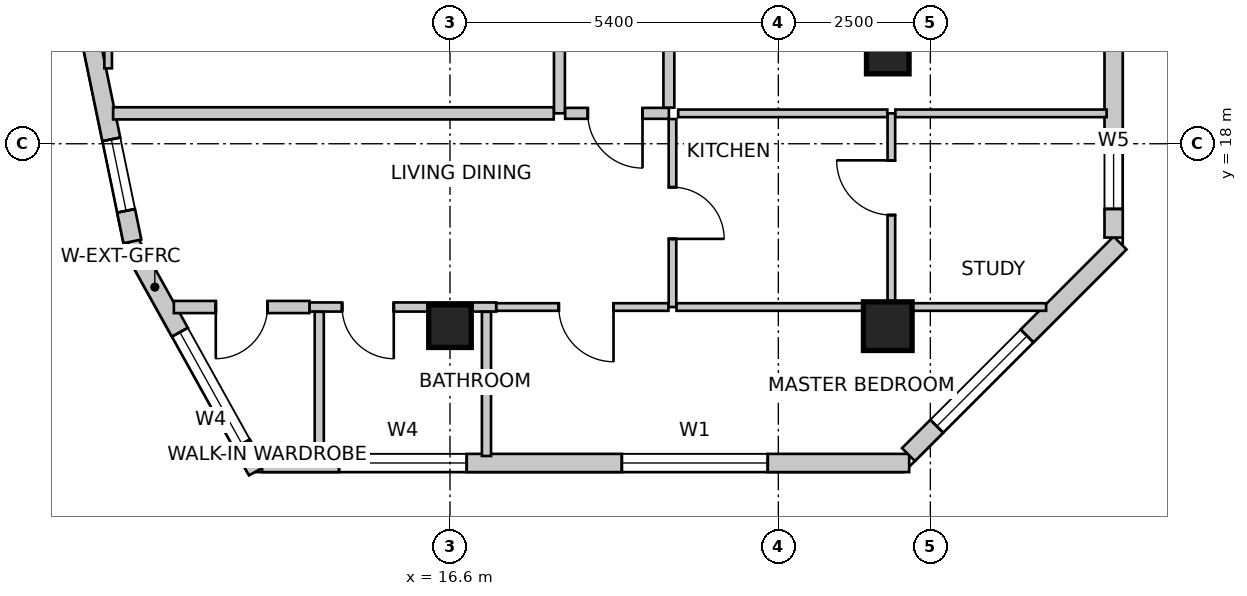
"""IFC4 building model, lengths in metres.
Left out: names, types, materials, properties, quantities, classifications, styles, units other than length and angle.
Written with IfcOpenShell. Run it as: python <this file> out.ifc"""

import sys

from ifc_helpers import new_model, si_unit, direction, frame, frame_2d, origin, origin_2d, place, context, subcontext, project, spatial, rectangle, extrude, source, transform, mapped, element, fill, save


model = new_model("IFC4")
c1 = context("Model", 3, precision=1e-05, world=origin(), true_north=direction((0.0, 1.0)))
c2 = subcontext(c1, "Body", "Model", "MODEL_VIEW")
j1 = project(units=[si_unit("LENGTHUNIT", "METRE"), si_unit("PLANEANGLEUNIT", "RADIAN")], contexts=[c1])
p1 = place(None, origin())
s1 = spatial("IfcSite", under=j1, at=p1, CompositionType="ELEMENT")
p2 = place(p1, origin())
s2 = spatial("IfcBuilding", under=s1, at=p2, CompositionType="ELEMENT")
p3 = place(p2, frame((0.0, 0.0, 193.9)))
s3 = spatial("IfcBuildingStorey", under=s2, at=p3, CompositionType="ELEMENT", Elevation=193.9)
m1 = source(origin(), c2, "Body", "SweptSolid", [
    extrude(rectangle(XDim=0.7, YDim=0.7, at=origin_2d()), origin(), (0.0, 0.0, 1.0), 3.5),
])
p4 = place(p3, frame((23.8, 19.5, 0.0), z_axis=(0.0, 0.0, 1.0), x_axis=(1.0, 0.0, 0.0)))
e1 = element("IfcColumn", 1, at=p4, inside=s3, PredefinedType="COLUMN", context=c2, shape_type="MappedRepresentation", body=[
    mapped(m1, transform((0.0, 0.0, 0.0), scale=1.0)),
])
m2 = source(origin(), c2, "Body", "SweptSolid", [
    extrude(rectangle(XDim=0.8, YDim=0.8, at=origin_2d()), origin(), (0.0, 0.0, 1.0), 3.5),
])
p5 = place(p3, frame((23.8, 15.0, 0.0), z_axis=(0.0, 0.0, 1.0), x_axis=(1.0, 0.0, 0.0)))
e2 = element("IfcColumn", 2, at=p5, inside=s3, PredefinedType="COLUMN", context=c2, shape_type="MappedRepresentation", body=[
    mapped(m2, transform((0.0, 0.0, 0.0), scale=1.0)),
])
p6 = place(p3, frame((16.6, 15.0, 0.0), z_axis=(0.0, 0.0, 1.0), x_axis=(1.0, 0.0, 0.0)))
e3 = element("IfcColumn", 3, at=p6, inside=s3, PredefinedType="COLUMN", context=c2, shape_type="MappedRepresentation", body=[
    mapped(m1, transform((0.0, 0.0, 0.0), scale=1.0)),
])
p7 = place(p3, frame((11.333, 16.384, 0.0), z_axis=(0.0, 0.0, 1.0), x_axis=(0.485633305139, -0.874162623852, 0.0)))
e4 = element("IfcWall", 4, at=p7, inside=s3, PredefinedType="SOLIDWALL", context=c2, shape_type="SweptSolid", body=[
    extrude(rectangle(XDim=4.307, YDim=0.3, at=frame_2d((2.153, 0.0))), origin(), (0.0, 0.0, 1.0), 3.25),
])
m3 = source(origin(), c2, "Body", "SweptSolid", [
    extrude(rectangle(XDim=2.1, YDim=2.0, at=frame_2d((1.05, 1.0))), frame((0.0, 0.16, 0.0), z_axis=(0.0, -1.0, 0.0), x_axis=(1.0, 0.0, 0.0)), (0.0, 0.0, 1.0), 0.32),
])
p8 = place(p7, frame((1.697, 0.0, 0.85)))
e5 = element("IfcOpeningElement", 5, at=p8, cuts=e4, PredefinedType="OPENING", context=c2, shape_type="MappedRepresentation", body=[
    mapped(m3, transform((0.0, 0.0, 0.0), scale=1.0)),
])
p9 = place(p3, frame((13.51, 12.75, 0.0), z_axis=(0.0, 0.0, 1.0), x_axis=(1.0, 0.0, 0.0)))
e6 = element("IfcWall", 6, at=p9, inside=s3, PredefinedType="SOLIDWALL", context=c2, shape_type="SweptSolid", body=[
    extrude(rectangle(XDim=10.642, YDim=0.3, at=frame_2d((5.321, 0.0))), origin(), (0.0, 0.0, 1.0), 3.25),
])
p10 = place(p9, frame((1.265, 0.0, 0.85)))
e7 = element("IfcOpeningElement", 7, at=p10, cuts=e6, PredefinedType="OPENING", context=c2, shape_type="MappedRepresentation", body=[
    mapped(m3, transform((0.0, 0.0, 0.0), scale=1.0)),
])
m4 = source(origin(), c2, "Body", "SweptSolid", [
    extrude(rectangle(XDim=2.4, YDim=2.2, at=frame_2d((1.2, 1.1))), frame((0.0, 0.16, 0.0), z_axis=(0.0, -1.0, 0.0), x_axis=(1.0, 0.0, 0.0)), (0.0, 0.0, 1.0), 0.32),
])
p11 = place(p9, frame((5.916, 0.0, 0.85)))
e8 = element("IfcOpeningElement", 8, at=p11, cuts=e6, PredefinedType="OPENING", context=c2, shape_type="MappedRepresentation", body=[
    mapped(m4, transform((0.0, 0.0, 0.0), scale=1.0)),
])
p12 = place(p3, frame((24.14, 12.888, 0.0), z_axis=(0.0, 0.0, 1.0), x_axis=(0.707106781187, 0.707106781187, 0.0)))
e9 = element("IfcWall", 9, at=p12, inside=s3, PredefinedType="SOLIDWALL", context=c2, shape_type="SweptSolid", body=[
    extrude(rectangle(XDim=4.922, YDim=0.3, at=frame_2d((2.461, 0.0))), origin(), (0.0, 0.0, 1.0), 3.25),
])
p13 = place(p12, frame((0.659, 0.0, 0.85)))
e10 = element("IfcOpeningElement", 10, at=p13, cuts=e9, PredefinedType="OPENING", context=c2, shape_type="MappedRepresentation", body=[
    mapped(m3, transform((0.0, 0.0, 0.0), scale=1.0)),
])
p14 = place(p3, frame((27.514, 16.457, 0.0), z_axis=(0.0, 0.0, 1.0), x_axis=(0.0, 1.0, 0.0)))
e11 = element("IfcWall", 11, at=p14, inside=s3, PredefinedType="SOLIDWALL", context=c2, shape_type="SweptSolid", body=[
    extrude(rectangle(XDim=13.679, YDim=0.3, at=frame_2d((6.839, 0.0))), origin(), (0.0, 0.0, 1.0), 3.25),
])
m5 = source(origin(), c2, "Body", "SweptSolid", [
    extrude(rectangle(XDim=1.6, YDim=2.15, at=frame_2d((0.8, 1.075))), frame((0.0, 0.16, 0.0), z_axis=(0.0, -1.0, 0.0), x_axis=(1.0, 0.0, 0.0)), (0.0, 0.0, 1.0), 0.32),
])
p15 = place(p14, frame((8.993, 0.0, 0.0)))
e12 = element("IfcOpeningElement", 12, at=p15, cuts=e11, PredefinedType="OPENING", context=c2, shape_type="MappedRepresentation", body=[
    mapped(m5, transform((0.0, 0.0, 0.0), scale=1.0)),
])
m6 = source(origin(), c2, "Body", "SweptSolid", [
    extrude(rectangle(XDim=1.2, YDim=1.6, at=frame_2d((0.6, 0.8))), frame((0.0, 0.16, 0.0), z_axis=(0.0, -1.0, 0.0), x_axis=(1.0, 0.0, 0.0)), (0.0, 0.0, 1.0), 0.32),
])
p16 = place(p14, frame((0.471, 0.0, 0.85)))
e13 = element("IfcOpeningElement", 13, at=p16, cuts=e11, PredefinedType="OPENING", context=c2, shape_type="MappedRepresentation", body=[
    mapped(m6, transform((0.0, 0.0, 0.0), scale=1.0)),
])
p17 = place(p14, frame((4.288, 0.0, 0.85)))
e14 = element("IfcOpeningElement", 14, at=p17, cuts=e11, PredefinedType="OPENING", context=c2, shape_type="MappedRepresentation", body=[
    mapped(m4, transform((0.0, 0.0, 0.0), scale=1.0)),
])
p18 = place(p14, frame((10.916, 0.0, 0.85)))
e15 = element("IfcOpeningElement", 15, at=p18, cuts=e11, PredefinedType="OPENING", context=c2, shape_type="MappedRepresentation", body=[
    mapped(m4, transform((0.0, 0.0, 0.0), scale=1.0)),
])
p19 = place(p3, frame((8.188, 31.834, 0.0), z_axis=(0.0, 0.0, 1.0), x_axis=(0.202303475707, -0.979322880217, 0.0)))
e16 = element("IfcWall", 16, at=p19, inside=s3, PredefinedType="SOLIDWALL", context=c2, shape_type="SweptSolid", body=[
    extrude(rectangle(XDim=15.766, YDim=0.3, at=frame_2d((7.883, 0.0))), origin(), (0.0, 0.0, 1.0), 3.25),
])
p20 = place(p19, frame((2.399, 0.0, 0.85)))
e17 = element("IfcOpeningElement", 17, at=p20, cuts=e16, PredefinedType="OPENING", context=c2, shape_type="MappedRepresentation", body=[
    mapped(m3, transform((0.0, 0.0, 0.0), scale=1.0)),
])
p21 = place(p19, frame((8.798, 0.0, 0.85)))
e18 = element("IfcOpeningElement", 18, at=p21, cuts=e16, PredefinedType="OPENING", context=c2, shape_type="MappedRepresentation", body=[
    mapped(m3, transform((0.0, 0.0, 0.0), scale=1.0)),
])
p22 = place(p19, frame((14.052, 0.0, 0.85)))
e19 = element("IfcOpeningElement", 19, at=p22, cuts=e16, PredefinedType="OPENING", context=c2, shape_type="MappedRepresentation", body=[
    mapped(m6, transform((0.0, 0.0, 0.0), scale=1.0)),
])
p23 = place(p3, frame((18.4, 18.5, 0.0), z_axis=(0.0, 0.0, 1.0), x_axis=(0.0, 1.0, 0.0)))
e20 = element("IfcWall", 20, at=p23, inside=s3, PredefinedType="PARTITIONING", context=c2, shape_type="SweptSolid", body=[
    extrude(rectangle(XDim=6.86, YDim=0.18, at=frame_2d((3.43, 0.0))), origin(), (0.0, 0.0, 1.0), 2.688),
])
m7 = source(origin(), c2, "Body", "SweptSolid", [
    extrude(rectangle(XDim=0.9, YDim=2.15, at=frame_2d((0.45, 1.075))), frame((0.0, 0.1, 0.0), z_axis=(0.0, -1.0, 0.0), x_axis=(1.0, 0.0, 0.0)), (0.0, 0.0, 1.0), 0.2),
])
p24 = place(p23, frame((2.98, 0.0, 0.0)))
e21 = element("IfcOpeningElement", 21, at=p24, cuts=e20, PredefinedType="OPENING", context=c2, shape_type="MappedRepresentation", body=[
    mapped(m7, transform((0.0, 0.0, 0.0), scale=1.0)),
])
p25 = place(p3, frame((20.2, 18.5, 0.0), z_axis=(0.0, 0.0, 1.0), x_axis=(-1.0, 0.0, 0.0)))
e22 = element("IfcWall", 22, at=p25, inside=s3, PredefinedType="PARTITIONING", context=c2, shape_type="SweptSolid", body=[
    extrude(rectangle(XDim=1.706, YDim=0.18, at=frame_2d((0.853, 0.0))), origin(), (0.0, 0.0, 1.0), 3.25),
])
p26 = place(p25, frame((0.434, 0.0, 0.0)))
e23 = element("IfcOpeningElement", 23, at=p26, cuts=e22, PredefinedType="OPENING", context=c2, shape_type="MappedRepresentation", body=[
    mapped(m7, transform((0.0, 0.0, 0.0), scale=1.0)),
])
p27 = place(p3, frame((20.2, 31.806, 0.0), z_axis=(0.0, 0.0, 1.0), x_axis=(0.0, -1.0, 0.0)))
e24 = element("IfcWall", 24, at=p27, inside=s3, PredefinedType="PARTITIONING", context=c2, shape_type="SweptSolid", body=[
    extrude(rectangle(XDim=13.212, YDim=0.18, at=frame_2d((6.606, 0.0))), origin(), (0.0, 0.0, 1.0), 2.688),
])
p28 = place(p27, frame((6.095, 0.0, 0.0)))
e25 = element("IfcOpeningElement", 25, at=p28, cuts=e24, PredefinedType="OPENING", context=c2, shape_type="MappedRepresentation", body=[
    mapped(m7, transform((0.0, 0.0, 0.0), scale=1.0)),
])
p29 = place(p3, frame((10.978, 19.24, 0.0), z_axis=(0.0, 0.0, 1.0), x_axis=(0.0, 1.0, 0.0)))
e26 = element("IfcWall", 26, at=p29, inside=s3, PredefinedType="PARTITIONING", context=c2, shape_type="SweptSolid", body=[
    extrude(rectangle(XDim=5.96, YDim=0.125, at=frame_2d((2.98, 0.0))), origin(), (0.0, 0.0, 1.0), 2.542),
])
m8 = source(origin(), c2, "Body", "SweptSolid", [
    extrude(rectangle(XDim=0.85, YDim=2.15, at=frame_2d((0.425, 1.075))), frame((0.0, 0.073, 0.0), z_axis=(0.0, -1.0, 0.0), x_axis=(1.0, 0.0, 0.0)), (0.0, 0.0, 1.0), 0.145),
])
p30 = place(p29, frame((2.125, 0.0, 0.0)))
e27 = element("IfcOpeningElement", 27, at=p30, cuts=e26, PredefinedType="OPENING", context=c2, shape_type="MappedRepresentation", body=[
    mapped(m8, transform((0.0, 0.0, 0.0), scale=1.0)),
])
p31 = place(p3, frame((18.306, 18.5, 0.0), z_axis=(0.0, 0.0, 1.0), x_axis=(-1.0, 0.0, 0.0)))
e28 = element("IfcWall", 28, at=p31, inside=s3, PredefinedType="PARTITIONING", context=c2, shape_type="SweptSolid", body=[
    extrude(rectangle(XDim=7.246, YDim=0.2, at=frame_2d((3.623, 0.0))), origin(), (0.0, 0.0, 1.0), 3.25),
])
p32 = place(p3, frame((23.859, 15.315, 0.0), z_axis=(0.0, 0.0, 1.0), x_axis=(0.0, 1.0, 0.0)))
e29 = element("IfcWall", 29, at=p32, inside=s3, PredefinedType="PARTITIONING", context=c2, shape_type="SweptSolid", body=[
    extrude(rectangle(XDim=3.185, YDim=0.125, at=frame_2d((1.593, 0.0))), origin(), (0.0, 0.0, 1.0), 2.542),
])
m9 = source(origin(), c2, "Body", "SweptSolid", [
    extrude(rectangle(XDim=0.9, YDim=2.15, at=frame_2d((0.45, 1.075))), frame((0.0, 0.073, 0.0), z_axis=(0.0, -1.0, 0.0), x_axis=(1.0, 0.0, 0.0)), (0.0, 0.0, 1.0), 0.145),
])
p33 = place(p32, frame((1.512, 0.0, 0.0)))
e30 = element("IfcOpeningElement", 30, at=p33, cuts=e29, PredefinedType="OPENING", context=c2, shape_type="MappedRepresentation", body=[
    mapped(m9, transform((0.0, 0.0, 0.0), scale=1.0)),
])
p34 = place(p3, frame((26.404, 15.315, 0.0), z_axis=(0.0, 0.0, 1.0), x_axis=(-1.0, 0.0, 0.0)))
e31 = element("IfcWall", 31, at=p34, inside=s3, PredefinedType="PARTITIONING", context=c2, shape_type="SweptSolid", body=[
    extrude(rectangle(XDim=2.479, YDim=0.125, at=frame_2d((1.239, 0.0))), origin(), (0.0, 0.0, 1.0), 3.25),
])
p35 = place(p3, frame((23.926, 18.5, 0.0), z_axis=(0.0, 0.0, 1.0), x_axis=(1.0, 0.0, 0.0)))
e32 = element("IfcWall", 32, at=p35, inside=s3, PredefinedType="PARTITIONING", context=c2, shape_type="SweptSolid", body=[
    extrude(rectangle(XDim=3.473, YDim=0.125, at=frame_2d((1.737, 0.0))), origin(), (0.0, 0.0, 1.0), 3.25),
])
p36 = place(p3, frame((20.259, 18.406, 0.0), z_axis=(0.0, 0.0, 1.0), x_axis=(0.0, -1.0, 0.0)))
e33 = element("IfcWall", 33, at=p36, inside=s3, PredefinedType="PARTITIONING", context=c2, shape_type="SweptSolid", body=[
    extrude(rectangle(XDim=3.091, YDim=0.125, at=frame_2d((1.545, 0.0))), origin(), (0.0, 0.0, 1.0), 2.688),
])
p37 = place(p36, frame((1.121, 0.0, 0.0)))
e34 = element("IfcOpeningElement", 34, at=p37, cuts=e33, PredefinedType="OPENING", context=c2, shape_type="MappedRepresentation", body=[
    mapped(m8, transform((0.0, 0.0, 0.0), scale=1.0)),
])
p38 = place(p3, frame((17.36, 15.315, 0.0), z_axis=(0.0, 0.0, 1.0), x_axis=(-1.0, 0.0, 0.0)))
e35 = element("IfcWall", 35, at=p38, inside=s3, PredefinedType="PARTITIONING", context=c2, shape_type="SweptSolid", body=[
    extrude(rectangle(XDim=3.07, YDim=0.15, at=frame_2d((1.535, 0.0))), origin(), (0.0, 0.0, 1.0), 2.688),
])
m10 = source(origin(), c2, "Body", "SweptSolid", [
    extrude(rectangle(XDim=0.85, YDim=2.15, at=frame_2d((0.425, 1.075))), frame((0.0, 0.085, 0.0), z_axis=(0.0, -1.0, 0.0), x_axis=(1.0, 0.0, 0.0)), (0.0, 0.0, 1.0), 0.17),
])
p39 = place(p38, frame((1.685, 0.0, 0.0)))
e36 = element("IfcOpeningElement", 36, at=p39, cuts=e35, PredefinedType="OPENING", context=c2, shape_type="MappedRepresentation", body=[
    mapped(m10, transform((0.0, 0.0, 0.0), scale=1.0)),
])
p40 = place(p3, frame((14.288, 15.315, 0.0), z_axis=(0.0, 0.0, 1.0), x_axis=(-1.0, 0.0, 0.0)))
e37 = element("IfcWall", 37, at=p40, inside=s3, PredefinedType="PARTITIONING", context=c2, shape_type="SweptSolid", body=[
    extrude(rectangle(XDim=2.229, YDim=0.2, at=frame_2d((1.115, 0.0))), origin(), (0.0, 0.0, 1.0), 3.25),
])
m11 = source(origin(), c2, "Body", "SweptSolid", [
    extrude(rectangle(XDim=0.85, YDim=2.15, at=frame_2d((0.425, 1.075))), frame((0.0, 0.11, 0.0), z_axis=(0.0, -1.0, 0.0), x_axis=(1.0, 0.0, 0.0)), (0.0, 0.0, 1.0), 0.22),
])
p41 = place(p40, frame((0.69, 0.0, 0.0)))
e38 = element("IfcOpeningElement", 38, at=p41, cuts=e37, PredefinedType="OPENING", context=c2, shape_type="MappedRepresentation", body=[
    mapped(m11, transform((0.0, 0.0, 0.0), scale=1.0)),
])
p42 = place(p3, frame((20.192, 15.315, 0.0), z_axis=(0.0, 0.0, 1.0), x_axis=(-1.0, 0.0, 0.0)))
e39 = element("IfcWall", 39, at=p42, inside=s3, PredefinedType="PARTITIONING", context=c2, shape_type="SweptSolid", body=[
    extrude(rectangle(XDim=2.83, YDim=0.125, at=frame_2d((1.415, 0.0))), origin(), (0.0, 0.0, 1.0), 3.25),
])
p43 = place(p42, frame((0.903, 0.0, 0.0)))
e40 = element("IfcOpeningElement", 40, at=p43, cuts=e39, PredefinedType="OPENING", context=c2, shape_type="MappedRepresentation", body=[
    mapped(m9, transform((0.0, 0.0, 0.0), scale=1.0)),
])
p44 = place(p3, frame((23.792, 15.315, 0.0), z_axis=(0.0, 0.0, 1.0), x_axis=(-1.0, 0.0, 0.0)))
e41 = element("IfcWall", 41, at=p44, inside=s3, PredefinedType="PARTITIONING", context=c2, shape_type="SweptSolid", body=[
    extrude(rectangle(XDim=3.467, YDim=0.125, at=frame_2d((1.733, 0.0))), origin(), (0.0, 0.0, 1.0), 2.542),
])
p45 = place(p3, frame((20.353, 18.5, 0.0), z_axis=(0.0, 0.0, 1.0), x_axis=(1.0, 0.0, 0.0)))
e42 = element("IfcWall", 42, at=p45, inside=s3, PredefinedType="PARTITIONING", context=c2, shape_type="SweptSolid", body=[
    extrude(rectangle(XDim=3.439, YDim=0.125, at=frame_2d((1.72, 0.0))), origin(), (0.0, 0.0, 1.0), 2.542),
])
p46 = place(p3, frame((14.45, 12.865, 0.0), z_axis=(0.0, 0.0, 1.0), x_axis=(0.0, 1.0, 0.0)))
e43 = element("IfcWall", 43, at=p46, inside=s3, PredefinedType="PARTITIONING", context=c2, shape_type="SweptSolid", body=[
    extrude(rectangle(XDim=2.371, YDim=0.15, at=frame_2d((1.186, 0.0))), origin(), (0.0, 0.0, 1.0), 3.25),
])
p47 = place(p3, frame((17.2, 15.236, 0.0), z_axis=(0.0, 0.0, 1.0), x_axis=(0.0, -1.0, 0.0)))
e44 = element("IfcWall", 44, at=p47, inside=s3, PredefinedType="PARTITIONING", context=c2, shape_type="SweptSolid", body=[
    extrude(rectangle(XDim=2.371, YDim=0.15, at=frame_2d((1.186, 0.0))), origin(), (0.0, 0.0, 1.0), 2.542),
])
m12 = source(origin(), c2, "Body", "SweptSolid", [
    extrude(rectangle(XDim=2.1, YDim=2.0, at=frame_2d((1.05, 1.0))), frame((0.0, -0.015, 0.0), z_axis=(0.0, -1.0, 0.0), x_axis=(1.0, 0.0, 0.0)), (0.0, 0.0, 1.0), 0.06),
])
p48 = place(p8, origin())
e45 = element("IfcWindow", 45, at=p48, inside=s3, PartitioningType="SINGLE_PANEL", PredefinedType="WINDOW", context=c2, shape_type="MappedRepresentation", body=[
    mapped(m12, transform((0.0, 0.0, 0.0), scale=1.0)),
])
fill(e5, e45)
p49 = place(p10, origin())
e46 = element("IfcWindow", 46, at=p49, inside=s3, PartitioningType="SINGLE_PANEL", PredefinedType="WINDOW", context=c2, shape_type="MappedRepresentation", body=[
    mapped(m12, transform((0.0, 0.0, 0.0), scale=1.0)),
])
fill(e7, e46)
m13 = source(origin(), c2, "Body", "SweptSolid", [
    extrude(rectangle(XDim=2.4, YDim=2.2, at=frame_2d((1.2, 1.1))), frame((0.0, -0.015, 0.0), z_axis=(0.0, -1.0, 0.0), x_axis=(1.0, 0.0, 0.0)), (0.0, 0.0, 1.0), 0.06),
])
p50 = place(p11, origin())
e47 = element("IfcWindow", 47, at=p50, inside=s3, PartitioningType="SINGLE_PANEL", PredefinedType="WINDOW", context=c2, shape_type="MappedRepresentation", body=[
    mapped(m13, transform((0.0, 0.0, 0.0), scale=1.0)),
])
fill(e8, e47)
p51 = place(p13, origin())
e48 = element("IfcWindow", 48, at=p51, inside=s3, PartitioningType="SINGLE_PANEL", PredefinedType="WINDOW", context=c2, shape_type="MappedRepresentation", body=[
    mapped(m12, transform((0.0, 0.0, 0.0), scale=1.0)),
])
fill(e10, e48)
m14 = source(origin(), c2, "Body", "SweptSolid", [
    extrude(rectangle(XDim=1.2, YDim=1.6, at=frame_2d((0.6, 0.8))), frame((0.0, -0.015, 0.0), z_axis=(0.0, -1.0, 0.0), x_axis=(1.0, 0.0, 0.0)), (0.0, 0.0, 1.0), 0.06),
])
p52 = place(p16, origin())
e49 = element("IfcWindow", 49, at=p52, inside=s3, PartitioningType="SINGLE_PANEL", PredefinedType="WINDOW", context=c2, shape_type="MappedRepresentation", body=[
    mapped(m14, transform((0.0, 0.0, 0.0), scale=1.0)),
])
fill(e13, e49)
p53 = place(p22, origin())
e50 = element("IfcWindow", 50, at=p53, inside=s3, PartitioningType="SINGLE_PANEL", PredefinedType="WINDOW", context=c2, shape_type="MappedRepresentation", body=[
    mapped(m14, transform((0.0, 0.0, 0.0), scale=1.0)),
])
fill(e19, e50)
m15 = source(origin(), c2, "Body", "SweptSolid", [
    extrude(rectangle(XDim=0.9, YDim=2.15, at=frame_2d((0.45, 1.075))), frame((0.0, 0.025, 0.0), z_axis=(0.0, -1.0, 0.0), x_axis=(1.0, 0.0, 0.0)), (0.0, 0.0, 1.0), 0.05),
])
p54 = place(p33, origin())
e51 = element("IfcDoor", 51, at=p54, inside=s3, OperationType="SINGLE_SWING_RIGHT", PredefinedType="DOOR", context=c2, shape_type="MappedRepresentation", body=[
    mapped(m15, transform((0.0, 0.0, 0.0), scale=1.0)),
])
fill(e30, e51)
m16 = source(origin(), c2, "Body", "SweptSolid", [
    extrude(rectangle(XDim=0.9, YDim=2.15, at=frame_2d((0.45, 1.075))), frame((0.0, 0.025, 0.0), z_axis=(0.0, -1.0, 0.0), x_axis=(1.0, 0.0, 0.0)), (0.0, 0.0, 1.0), 0.05),
])
p55 = place(p26, origin())
e52 = element("IfcDoor", 52, at=p55, inside=s3, OperationType="SINGLE_SWING_LEFT", PredefinedType="DOOR", context=c2, shape_type="MappedRepresentation", body=[
    mapped(m16, transform((0.0, 0.0, 0.0), scale=1.0)),
])
fill(e23, e52)
m17 = source(origin(), c2, "Body", "SweptSolid", [
    extrude(rectangle(XDim=0.85, YDim=2.15, at=frame_2d((0.425, 1.075))), frame((0.0, 0.025, 0.0), z_axis=(0.0, -1.0, 0.0), x_axis=(1.0, 0.0, 0.0)), (0.0, 0.0, 1.0), 0.05),
])
p56 = place(p37, origin())
e53 = element("IfcDoor", 53, at=p56, inside=s3, OperationType="SINGLE_SWING_RIGHT", PredefinedType="DOOR", context=c2, shape_type="MappedRepresentation", body=[
    mapped(m17, transform((0.0, 0.0, 0.0), scale=1.0)),
])
fill(e34, e53)
p57 = place(p39, origin())
e54 = element("IfcDoor", 54, at=p57, inside=s3, OperationType="SINGLE_SWING_LEFT", PredefinedType="DOOR", context=c2, shape_type="MappedRepresentation", body=[
    mapped(m17, transform((0.0, 0.0, 0.0), scale=1.0)),
])
fill(e36, e54)
p58 = place(p41, origin())
e55 = element("IfcDoor", 55, at=p58, inside=s3, OperationType="SINGLE_SWING_RIGHT", PredefinedType="DOOR", context=c2, shape_type="MappedRepresentation", body=[
    mapped(m17, transform((0.0, 0.0, 0.0), scale=1.0)),
])
fill(e38, e55)
p59 = place(p43, origin())
e56 = element("IfcDoor", 56, at=p59, inside=s3, OperationType="SINGLE_SWING_LEFT", PredefinedType="DOOR", context=c2, shape_type="MappedRepresentation", body=[
    mapped(m15, transform((0.0, 0.0, 0.0), scale=1.0)),
])
fill(e40, e56)
save(model, sys.argv[1])
